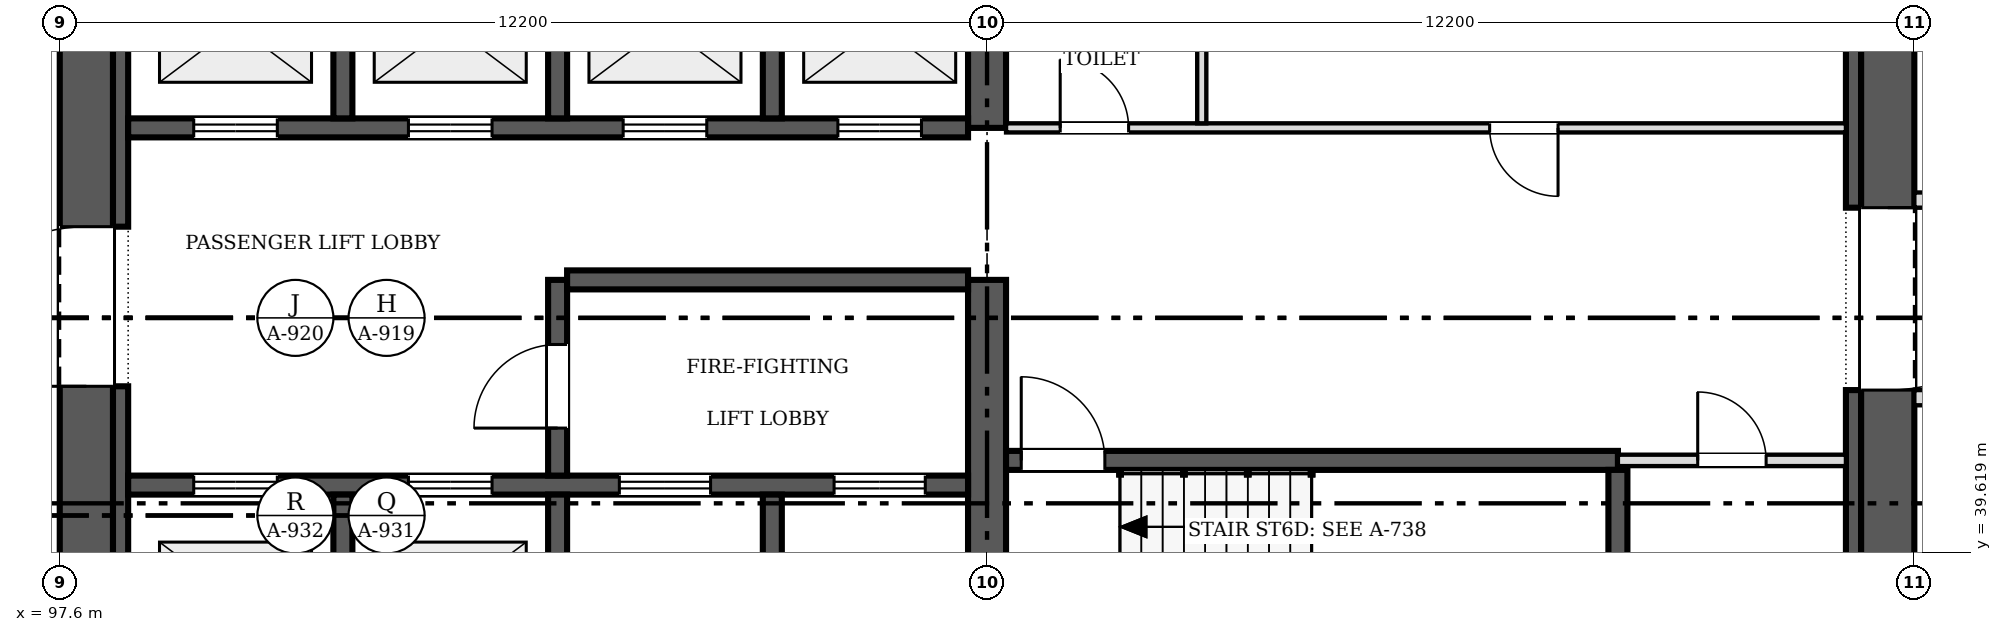
"""IFC4 building model, lengths in metres.
Left out: names, types, materials, properties, quantities, classifications, styles, units other than length and angle.
Written with IfcOpenShell. Run it as: python <this file> out.ifc"""

import sys

from ifc_helpers import new_model, si_unit, direction, frame, frame_2d, origin, place, context, subcontext, project, spatial, rectangle, extrude, source, transform, mapped, element, fill, save


model = new_model("IFC4")
c1 = context("Model", 3, precision=1e-05, world=origin(), true_north=direction((0.0, 1.0)))
c2 = subcontext(c1, "Body", "Model", "MODEL_VIEW")
j1 = project(units=[si_unit("LENGTHUNIT", "METRE"), si_unit("PLANEANGLEUNIT", "RADIAN")], contexts=[c1])
p1 = place(None, origin())
s1 = spatial("IfcSite", under=j1, at=p1, CompositionType="ELEMENT")
p2 = place(p1, origin())
s2 = spatial("IfcBuilding", under=s1, at=p2, CompositionType="ELEMENT")
p3 = place(p2, origin())
s3 = spatial("IfcBuildingStorey", under=s2, at=p3, CompositionType="ELEMENT", Elevation=0.0)
p4 = place(p3, frame((97.95, 37.3, 0.0), z_axis=(0.0, 0.0, 1.0), x_axis=(0.0, 1.0, 0.0)))
e1 = element("IfcWall", 1, at=p4, inside=s3, PredefinedType="SHEAR", context=c2, shape_type="SweptSolid", body=[
    extrude(rectangle(XDim=10.8, YDim=0.7, at=frame_2d((5.4, 0.0))), origin(), (0.0, 0.0, 1.0), 7.2),
])
m1 = source(origin(), c2, "Body", "SweptSolid", [
    extrude(rectangle(XDim=2.1, YDim=2.4, at=frame_2d((1.05, 1.2))), frame((0.0, 0.36, 0.0), z_axis=(0.0, -1.0, 0.0), x_axis=(1.0, 0.0, 0.0)), (0.0, 0.0, 1.0), 0.72),
])
p5 = place(p4, frame((4.5, 0.0, 0.0)))
e2 = element("IfcOpeningElement", 2, at=p5, cuts=e1, PredefinedType="OPENING", context=c2, shape_type="MappedRepresentation", body=[
    mapped(m1, transform((0.0, 0.0, 0.0), scale=1.0)),
])
p6 = place(p3, frame((121.65, 48.1, 0.0), z_axis=(0.0, 0.0, 1.0), x_axis=(0.0, -1.0, 0.0)))
e3 = element("IfcWall", 3, at=p6, inside=s3, PredefinedType="SHEAR", context=c2, shape_type="SweptSolid", body=[
    extrude(rectangle(XDim=10.8, YDim=0.7, at=frame_2d((5.4, 0.0))), origin(), (0.0, 0.0, 1.0), 7.2),
])
m2 = source(origin(), c2, "Body", "SweptSolid", [
    extrude(rectangle(XDim=2.4, YDim=2.1, at=frame_2d((1.2, 1.05))), frame((0.0, 0.36, 0.0), z_axis=(0.0, -1.0, 0.0), x_axis=(1.0, 0.0, 0.0)), (0.0, 0.0, 1.0), 0.72),
])
p7 = place(p6, frame((3.95, 0.0, 0.0)))
e4 = element("IfcOpeningElement", 4, at=p7, cuts=e3, PredefinedType="OPENING", context=c2, shape_type="MappedRepresentation", body=[
    mapped(m2, transform((0.0, 0.0, 0.0), scale=1.0)),
])
p8 = place(p3, frame((98.4, 37.5, 0.0), z_axis=(0.0, 0.0, 1.0), x_axis=(0.0, 1.0, 0.0)))
e5 = element("IfcWall", 5, at=p8, inside=s3, PredefinedType="SOLIDWALL", context=c2, shape_type="SweptSolid", body=[
    extrude(rectangle(XDim=4.3, YDim=0.2, at=frame_2d((2.15, 0.0))), origin(), (0.0, 0.0, 1.0), 7.2),
])
p9 = place(p3, frame((98.4, 43.9, 0.0), z_axis=(0.0, 0.0, 1.0), x_axis=(0.0, 1.0, 0.0)))
e6 = element("IfcWall", 6, at=p9, inside=s3, PredefinedType="SOLIDWALL", context=c2, shape_type="SweptSolid", body=[
    extrude(rectangle(XDim=4.0, YDim=0.2, at=frame_2d((2.0, 0.0))), origin(), (0.0, 0.0, 1.0), 7.2),
])
p10 = place(p3, frame((121.2, 37.5, 0.0), z_axis=(0.0, 0.0, 1.0), x_axis=(0.0, 1.0, 0.0)))
e7 = element("IfcWall", 7, at=p10, inside=s3, PredefinedType="SOLIDWALL", context=c2, shape_type="SweptSolid", body=[
    extrude(rectangle(XDim=4.25, YDim=0.2, at=frame_2d((2.125, 0.0))), origin(), (0.0, 0.0, 1.0), 7.2),
])
p11 = place(p3, frame((121.2, 44.15, 0.0), z_axis=(0.0, 0.0, 1.0), x_axis=(0.0, 1.0, 0.0)))
e8 = element("IfcWall", 8, at=p11, inside=s3, PredefinedType="SOLIDWALL", context=c2, shape_type="SweptSolid", body=[
    extrude(rectangle(XDim=3.75, YDim=0.2, at=frame_2d((1.875, 0.0))), origin(), (0.0, 0.0, 1.0), 7.2),
])
p12 = place(p3, frame((109.8, 37.5, 0.0), z_axis=(0.0, 0.0, 1.0), x_axis=(0.0, 1.0, 0.0)))
e9 = element("IfcWall", 9, at=p12, inside=s3, PredefinedType="SHEAR", context=c2, shape_type="SweptSolid", body=[
    extrude(rectangle(XDim=5.7, YDim=0.5, at=frame_2d((2.85, 0.0))), origin(), (0.0, 0.0, 1.0), 7.2),
])
p13 = place(p3, frame((109.8, 45.2, 0.0), z_axis=(0.0, 0.0, 1.0), x_axis=(0.0, 1.0, 0.0)))
e10 = element("IfcWall", 10, at=p13, inside=s3, PredefinedType="SHEAR", context=c2, shape_type="SweptSolid", body=[
    extrude(rectangle(XDim=2.7, YDim=0.5, at=frame_2d((1.35, 0.0))), origin(), (0.0, 0.0, 1.0), 7.2),
])
p14 = place(p3, frame((98.5, 40.5, 0.0), z_axis=(0.0, 0.0, 1.0), x_axis=(1.0, 0.0, 0.0)))
e11 = element("IfcWall", 11, at=p14, inside=s3, PredefinedType="SOLIDWALL", context=c2, shape_type="SweptSolid", body=[
    extrude(rectangle(XDim=11.05, YDim=0.25, at=frame_2d((5.525, 0.0))), origin(), (0.0, 0.0, 1.0), 7.2),
])
m3 = source(origin(), c2, "Body", "SweptSolid", [
    extrude(rectangle(XDim=1.1, YDim=2.1, at=frame_2d((0.55, 1.05))), frame((0.0, 0.135, 0.0), z_axis=(0.0, -1.0, 0.0), x_axis=(1.0, 0.0, 0.0)), (0.0, 0.0, 1.0), 0.27),
])
p15 = place(p14, frame((0.863, 0.0, 0.0)))
e12 = element("IfcOpeningElement", 12, at=p15, cuts=e11, PredefinedType="OPENING", context=c2, shape_type="MappedRepresentation", body=[
    mapped(m3, transform((0.0, 0.0, 0.0), scale=1.0)),
])
p16 = place(p14, frame((3.688, 0.0, 0.0)))
e13 = element("IfcOpeningElement", 13, at=p16, cuts=e11, PredefinedType="OPENING", context=c2, shape_type="MappedRepresentation", body=[
    mapped(m3, transform((0.0, 0.0, 0.0), scale=1.0)),
])
m4 = source(origin(), c2, "Body", "SweptSolid", [
    extrude(rectangle(XDim=1.2, YDim=2.1, at=frame_2d((0.6, 1.05))), frame((0.0, 0.135, 0.0), z_axis=(0.0, -1.0, 0.0), x_axis=(1.0, 0.0, 0.0)), (0.0, 0.0, 1.0), 0.27),
])
p17 = place(p14, frame((6.462, 0.0, 0.0)))
e14 = element("IfcOpeningElement", 14, at=p17, cuts=e11, PredefinedType="OPENING", context=c2, shape_type="MappedRepresentation", body=[
    mapped(m4, transform((0.0, 0.0, 0.0), scale=1.0)),
])
p18 = place(p14, frame((9.288, 0.0, 0.0)))
e15 = element("IfcOpeningElement", 15, at=p18, cuts=e11, PredefinedType="OPENING", context=c2, shape_type="MappedRepresentation", body=[
    mapped(m4, transform((0.0, 0.0, 0.0), scale=1.0)),
])
p19 = place(p3, frame((109.55, 45.2, 0.0), z_axis=(0.0, 0.0, 1.0), x_axis=(-1.0, 0.0, 0.0)))
e16 = element("IfcWall", 16, at=p19, inside=s3, PredefinedType="SOLIDWALL", context=c2, shape_type="SweptSolid", body=[
    extrude(rectangle(XDim=11.05, YDim=0.25, at=frame_2d((5.525, 0.0))), origin(), (0.0, 0.0, 1.0), 7.2),
])
p20 = place(p19, frame((9.087, 0.0, 0.0)))
e17 = element("IfcOpeningElement", 17, at=p20, cuts=e16, PredefinedType="OPENING", context=c2, shape_type="MappedRepresentation", body=[
    mapped(m3, transform((0.0, 0.0, 0.0), scale=1.0)),
])
p21 = place(p19, frame((6.262, 0.0, 0.0)))
e18 = element("IfcOpeningElement", 18, at=p21, cuts=e16, PredefinedType="OPENING", context=c2, shape_type="MappedRepresentation", body=[
    mapped(m3, transform((0.0, 0.0, 0.0), scale=1.0)),
])
p22 = place(p19, frame((3.438, 0.0, 0.0)))
e19 = element("IfcOpeningElement", 19, at=p22, cuts=e16, PredefinedType="OPENING", context=c2, shape_type="MappedRepresentation", body=[
    mapped(m3, transform((0.0, 0.0, 0.0), scale=1.0)),
])
p23 = place(p19, frame((0.613, 0.0, 0.0)))
e20 = element("IfcOpeningElement", 20, at=p23, cuts=e16, PredefinedType="OPENING", context=c2, shape_type="MappedRepresentation", body=[
    mapped(m3, transform((0.0, 0.0, 0.0), scale=1.0)),
])
p24 = place(p3, frame((118.1, 40.825, 0.0), z_axis=(0.0, 0.0, 1.0), x_axis=(-1.0, 0.0, 0.0)))
e21 = element("IfcWall", 21, at=p24, inside=s3, PredefinedType="SOLIDWALL", context=c2, shape_type="SweptSolid", body=[
    extrude(rectangle(XDim=8.05, YDim=0.25, at=frame_2d((4.025, 0.0))), origin(), (0.0, 0.0, 1.0), 7.2),
])
p25 = place(p24, frame((6.75, 0.0, 0.0)))
e22 = element("IfcOpeningElement", 22, at=p25, cuts=e21, PredefinedType="OPENING", context=c2, shape_type="MappedRepresentation", body=[
    mapped(m3, transform((0.0, 0.0, 0.0), scale=1.0)),
])
p26 = place(p3, frame((104.15, 37.5, 0.0), z_axis=(0.0, 0.0, 1.0), x_axis=(0.0, 1.0, 0.0)))
e23 = element("IfcWall", 23, at=p26, inside=s3, PredefinedType="SOLIDWALL", context=c2, shape_type="SweptSolid", body=[
    extrude(rectangle(XDim=2.875, YDim=0.25, at=frame_2d((1.438, 0.0))), origin(), (0.0, 0.0, 1.0), 7.2),
])
p27 = place(p3, frame((104.15, 43.2, 0.0), z_axis=(0.0, 0.0, 1.0), x_axis=(0.0, -1.0, 0.0)))
e24 = element("IfcWall", 24, at=p27, inside=s3, PredefinedType="SOLIDWALL", context=c2, shape_type="SweptSolid", body=[
    extrude(rectangle(XDim=2.575, YDim=0.25, at=frame_2d((1.288, 0.0))), origin(), (0.0, 0.0, 1.0), 7.2),
])
p28 = place(p27, frame((0.85, 0.0, 0.0)))
e25 = element("IfcOpeningElement", 25, at=p28, cuts=e24, PredefinedType="OPENING", context=c2, shape_type="MappedRepresentation", body=[
    mapped(m3, transform((0.0, 0.0, 0.0), scale=1.0)),
])
p29 = place(p3, frame((104.275, 43.2, 0.0), z_axis=(0.0, 0.0, 1.0), x_axis=(1.0, 0.0, 0.0)))
e26 = element("IfcWall", 26, at=p29, inside=s3, PredefinedType="SOLIDWALL", context=c2, shape_type="SweptSolid", body=[
    extrude(rectangle(XDim=5.275, YDim=0.25, at=frame_2d((2.638, 0.0))), origin(), (0.0, 0.0, 1.0), 7.2),
])
p30 = place(p3, frame((118.1, 37.5, 0.0), z_axis=(0.0, 0.0, 1.0), x_axis=(0.0, 1.0, 0.0)))
e27 = element("IfcWall", 27, at=p30, inside=s3, PredefinedType="SOLIDWALL", context=c2, shape_type="SweptSolid", body=[
    extrude(rectangle(XDim=3.2, YDim=0.25, at=frame_2d((1.6, 0.0))), origin(), (0.0, 0.0, 1.0), 7.2),
])
for number, where, z_axis, x_axis in (
    (28, (101.325, 37.5, 0.0), (0.0, 0.0, 1.0), (0.0, 1.0, 0.0)),
    (29, (106.975, 37.5, 0.0), (0.0, 0.0, 1.0), (0.0, 1.0, 0.0)),
):
    element("IfcWall", number, at=place(p3, frame(where, z_axis=z_axis, x_axis=x_axis)), inside=s3, PredefinedType="SOLIDWALL", context=c2, shape_type="SweptSolid", body=[
        extrude(rectangle(XDim=2.875, YDim=0.25, at=frame_2d((1.438, 0.0))), origin(), (0.0, 0.0, 1.0), 7.2),
    ])
for number, where, z_axis, x_axis in (
    (30, (101.325, 45.325, 0.0), (0.0, 0.0, 1.0), (0.0, 1.0, 0.0)),
    (31, (104.15, 45.325, 0.0), (0.0, 0.0, 1.0), (0.0, 1.0, 0.0)),
    (32, (106.975, 45.325, 0.0), (0.0, 0.0, 1.0), (0.0, 1.0, 0.0)),
):
    element("IfcWall", number, at=place(p3, frame(where, z_axis=z_axis, x_axis=x_axis)), inside=s3, PredefinedType="SOLIDWALL", context=c2, shape_type="SweptSolid", body=[
        extrude(rectangle(XDim=2.575, YDim=0.25, at=frame_2d((1.288, 0.0))), origin(), (0.0, 0.0, 1.0), 7.2),
    ])
p31 = place(p3, frame((110.05, 45.2, 0.0), z_axis=(0.0, 0.0, 1.0), x_axis=(1.0, 0.0, 0.0)))
e33 = element("IfcWall", 33, at=p31, inside=s3, PredefinedType="PARTITIONING", context=c2, shape_type="SweptSolid", body=[
    extrude(rectangle(XDim=11.05, YDim=0.12, at=frame_2d((5.525, 0.0))), origin(), (0.0, 0.0, 1.0), 6.95),
])
m5 = source(origin(), c2, "Body", "SweptSolid", [
    extrude(rectangle(XDim=0.9, YDim=2.1, at=frame_2d((0.45, 1.05))), frame((0.0, 0.07, 0.0), z_axis=(0.0, -1.0, 0.0), x_axis=(1.0, 0.0, 0.0)), (0.0, 0.0, 1.0), 0.14),
])
p32 = place(p31, frame((0.712, 0.0, 0.0)))
e34 = element("IfcOpeningElement", 34, at=p32, cuts=e33, PredefinedType="OPENING", context=c2, shape_type="MappedRepresentation", body=[
    mapped(m5, transform((0.0, 0.0, 0.0), scale=1.0)),
])
p33 = place(p31, frame((6.363, 0.0, 0.0)))
e35 = element("IfcOpeningElement", 35, at=p33, cuts=e33, PredefinedType="OPENING", context=c2, shape_type="MappedRepresentation", body=[
    mapped(m5, transform((0.0, 0.0, 0.0), scale=1.0)),
])
p34 = place(p3, frame((121.1, 40.825, 0.0), z_axis=(0.0, 0.0, 1.0), x_axis=(-1.0, 0.0, 0.0)))
e36 = element("IfcWall", 36, at=p34, inside=s3, PredefinedType="PARTITIONING", context=c2, shape_type="SweptSolid", body=[
    extrude(rectangle(XDim=3.0, YDim=0.15, at=frame_2d((1.5, 0.0))), origin(), (0.0, 0.0, 1.0), 6.95),
])
m6 = source(origin(), c2, "Body", "SweptSolid", [
    extrude(rectangle(XDim=0.9, YDim=2.1, at=frame_2d((0.45, 1.05))), frame((0.0, 0.085, 0.0), z_axis=(0.0, -1.0, 0.0), x_axis=(1.0, 0.0, 0.0)), (0.0, 0.0, 1.0), 0.17),
])
p35 = place(p34, frame((1.05, 0.0, 0.0)))
e37 = element("IfcOpeningElement", 37, at=p35, cuts=e36, PredefinedType="OPENING", context=c2, shape_type="MappedRepresentation", body=[
    mapped(m6, transform((0.0, 0.0, 0.0), scale=1.0)),
])
p36 = place(p3, frame((112.625, 45.26, 0.0), z_axis=(0.0, 0.0, 1.0), x_axis=(0.0, 1.0, 0.0)))
e38 = element("IfcWall", 38, at=p36, inside=s3, PredefinedType="PARTITIONING", context=c2, shape_type="SweptSolid", body=[
    extrude(rectangle(XDim=2.64, YDim=0.12, at=frame_2d((1.32, 0.0))), origin(), (0.0, 0.0, 1.0), 6.95),
])
for number, where, z_axis, x_axis in (
    (39, (122.0, 41.65, 0.0), (0.0, 0.0, 1.0), (1.0, 0.0, 0.0)),
    (40, (122.0, 44.25, 0.0), (0.0, 0.0, 1.0), (1.0, 0.0, 0.0)),
):
    element("IfcWall", number, at=place(p3, frame(where, z_axis=z_axis, x_axis=x_axis)), inside=s3, PredefinedType="PARTITIONING", context=c2, shape_type="SweptSolid", body=[
        extrude(rectangle(XDim=16.2, YDim=0.2, at=frame_2d((8.1, 0.0))), origin(), (0.0, 0.0, 1.0), 6.115),
    ])
m7 = source(origin(), c2, "Body", "SweptSolid", [
    extrude(rectangle(XDim=2.1, YDim=2.4, at=frame_2d((1.05, 1.2))), frame((0.0, 0.025, 0.0), z_axis=(0.0, -1.0, 0.0), x_axis=(1.0, 0.0, 0.0)), (0.0, 0.0, 1.0), 0.05),
])
p37 = place(p5, origin())
e41 = element("IfcDoor", 41, at=p37, inside=s3, OperationType="DOUBLE_DOOR_SINGLE_SWING", PredefinedType="DOOR", context=c2, shape_type="MappedRepresentation", body=[
    mapped(m7, transform((0.0, 0.0, 0.0), scale=1.0)),
])
fill(e2, e41)
m8 = source(origin(), c2, "Body", "SweptSolid", [
    extrude(rectangle(XDim=2.4, YDim=2.1, at=frame_2d((1.2, 1.05))), frame((0.0, 0.025, 0.0), z_axis=(0.0, -1.0, 0.0), x_axis=(1.0, 0.0, 0.0)), (0.0, 0.0, 1.0), 0.05),
])
p38 = place(p7, origin())
e42 = element("IfcDoor", 42, at=p38, inside=s3, OperationType="SINGLE_SWING_LEFT", PredefinedType="DOOR", context=c2, shape_type="MappedRepresentation", body=[
    mapped(m8, transform((0.0, 0.0, 0.0), scale=1.0)),
])
fill(e4, e42)
m9 = source(origin(), c2, "Body", "SweptSolid", [
    extrude(rectangle(XDim=1.1, YDim=2.1, at=frame_2d((0.55, 1.05))), frame((0.0, 0.025, 0.0), z_axis=(0.0, -1.0, 0.0), x_axis=(1.0, 0.0, 0.0)), (0.0, 0.0, 1.0), 0.05),
])
p39 = place(p15, origin())
e43 = element("IfcDoor", 43, at=p39, inside=s3, OperationType="DOUBLE_DOOR_SLIDING", PredefinedType="DOOR", context=c2, shape_type="MappedRepresentation", body=[
    mapped(m9, transform((0.0, 0.0, 0.0), scale=1.0)),
])
fill(e12, e43)
p40 = place(p16, origin())
e44 = element("IfcDoor", 44, at=p40, inside=s3, OperationType="DOUBLE_DOOR_SLIDING", PredefinedType="DOOR", context=c2, shape_type="MappedRepresentation", body=[
    mapped(m9, transform((0.0, 0.0, 0.0), scale=1.0)),
])
fill(e13, e44)
m10 = source(origin(), c2, "Body", "SweptSolid", [
    extrude(rectangle(XDim=1.2, YDim=2.1, at=frame_2d((0.6, 1.05))), frame((0.0, 0.025, 0.0), z_axis=(0.0, -1.0, 0.0), x_axis=(1.0, 0.0, 0.0)), (0.0, 0.0, 1.0), 0.05),
])
p41 = place(p17, origin())
e45 = element("IfcDoor", 45, at=p41, inside=s3, OperationType="DOUBLE_DOOR_SLIDING", PredefinedType="DOOR", context=c2, shape_type="MappedRepresentation", body=[
    mapped(m10, transform((0.0, 0.0, 0.0), scale=1.0)),
])
fill(e14, e45)
p42 = place(p18, origin())
e46 = element("IfcDoor", 46, at=p42, inside=s3, OperationType="DOUBLE_DOOR_SLIDING", PredefinedType="DOOR", context=c2, shape_type="MappedRepresentation", body=[
    mapped(m10, transform((0.0, 0.0, 0.0), scale=1.0)),
])
fill(e15, e46)
p43 = place(p20, origin())
e47 = element("IfcDoor", 47, at=p43, inside=s3, OperationType="DOUBLE_DOOR_SLIDING", PredefinedType="DOOR", context=c2, shape_type="MappedRepresentation", body=[
    mapped(m9, transform((0.0, 0.0, 0.0), scale=1.0)),
])
fill(e17, e47)
p44 = place(p21, origin())
e48 = element("IfcDoor", 48, at=p44, inside=s3, OperationType="DOUBLE_DOOR_SLIDING", PredefinedType="DOOR", context=c2, shape_type="MappedRepresentation", body=[
    mapped(m9, transform((0.0, 0.0, 0.0), scale=1.0)),
])
fill(e18, e48)
p45 = place(p22, origin())
e49 = element("IfcDoor", 49, at=p45, inside=s3, OperationType="DOUBLE_DOOR_SLIDING", PredefinedType="DOOR", context=c2, shape_type="MappedRepresentation", body=[
    mapped(m9, transform((0.0, 0.0, 0.0), scale=1.0)),
])
fill(e19, e49)
p46 = place(p23, origin())
e50 = element("IfcDoor", 50, at=p46, inside=s3, OperationType="DOUBLE_DOOR_SLIDING", PredefinedType="DOOR", context=c2, shape_type="MappedRepresentation", body=[
    mapped(m9, transform((0.0, 0.0, 0.0), scale=1.0)),
])
fill(e20, e50)
p47 = place(p25, origin())
e51 = element("IfcDoor", 51, at=p47, inside=s3, OperationType="SINGLE_SWING_RIGHT", PredefinedType="DOOR", context=c2, shape_type="MappedRepresentation", body=[
    mapped(m9, transform((0.0, 0.0, 0.0), scale=1.0)),
])
fill(e22, e51)
p48 = place(p28, origin())
e52 = element("IfcDoor", 52, at=p48, inside=s3, OperationType="SINGLE_SWING_RIGHT", PredefinedType="DOOR", context=c2, shape_type="MappedRepresentation", body=[
    mapped(m9, transform((0.0, 0.0, 0.0), scale=1.0)),
])
fill(e25, e52)
m11 = source(origin(), c2, "Body", "SweptSolid", [
    extrude(rectangle(XDim=0.9, YDim=2.1, at=frame_2d((0.45, 1.05))), frame((0.0, 0.025, 0.0), z_axis=(0.0, -1.0, 0.0), x_axis=(1.0, 0.0, 0.0)), (0.0, 0.0, 1.0), 0.05),
])
p49 = place(p32, origin())
e53 = element("IfcDoor", 53, at=p49, inside=s3, OperationType="SINGLE_SWING_LEFT", PredefinedType="DOOR", context=c2, shape_type="MappedRepresentation", body=[
    mapped(m11, transform((0.0, 0.0, 0.0), scale=1.0)),
])
fill(e34, e53)
p50 = place(p33, origin())
e54 = element("IfcDoor", 54, at=p50, inside=s3, OperationType="SINGLE_SWING_RIGHT", PredefinedType="DOOR", context=c2, shape_type="MappedRepresentation", body=[
    mapped(m11, transform((0.0, 0.0, 0.0), scale=1.0)),
])
fill(e35, e54)
p51 = place(p35, origin())
e55 = element("IfcDoor", 55, at=p51, inside=s3, OperationType="SINGLE_SWING_RIGHT", PredefinedType="DOOR", context=c2, shape_type="MappedRepresentation", body=[
    mapped(m11, transform((0.0, 0.0, 0.0), scale=1.0)),
])
fill(e37, e55)
save(model, sys.argv[1])
